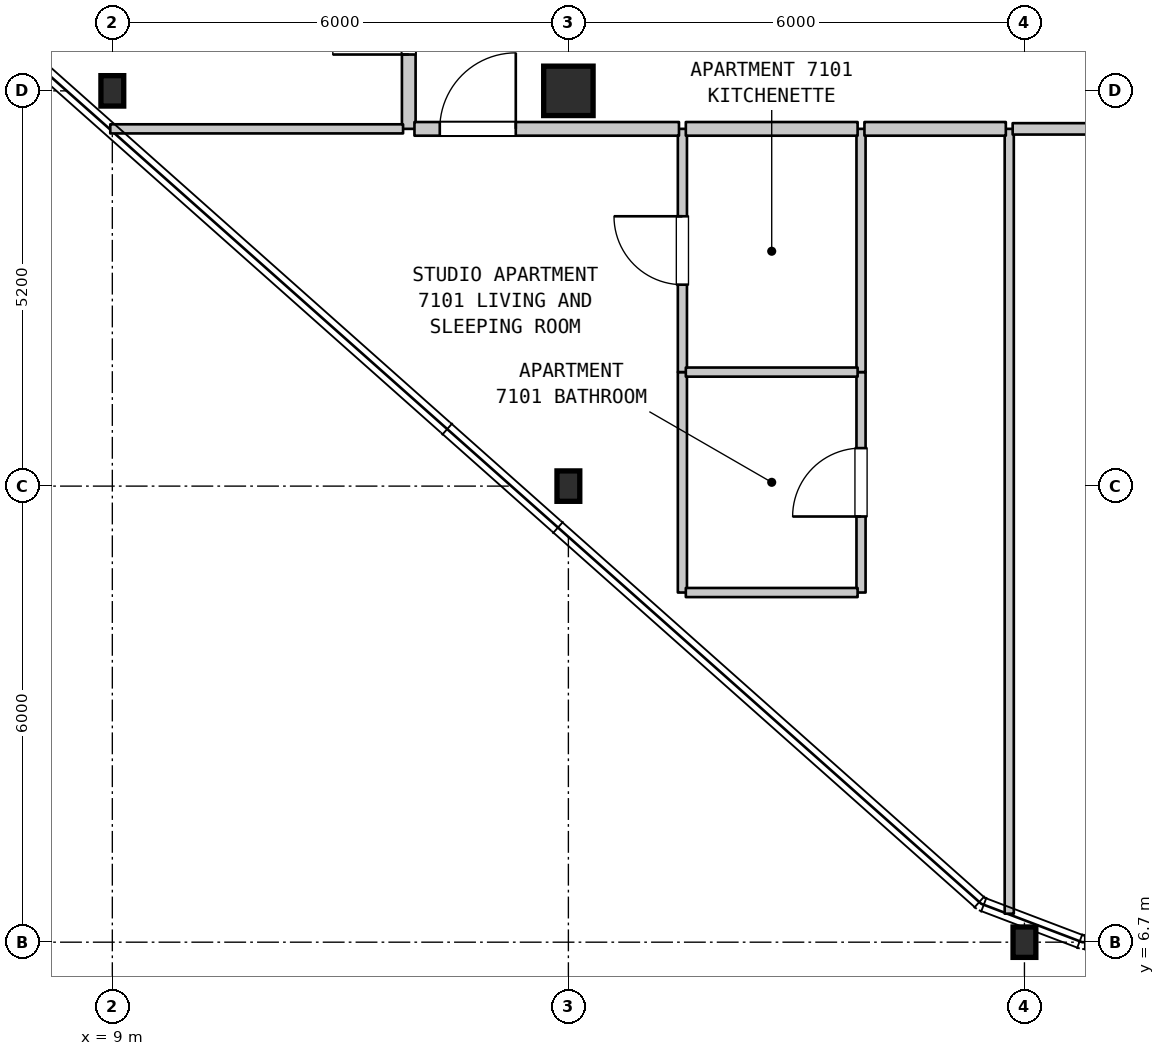
"""IFC4 building model, lengths in metres.
Left out: names, types, materials, properties, quantities, classifications, styles, units other than length and angle.
Written with IfcOpenShell. Run it as: python <this file> out.ifc"""

import sys

from ifc_helpers import new_model, si_unit, direction, frame, frame_2d, origin, origin_2d, place, context, subcontext, project, spatial, rectangle, i_section, extrude, element, fill, save


model = new_model("IFC4")
c1 = context("Model", 3, precision=1e-05, world=origin(), true_north=direction((0.0, 1.0)))
c2 = subcontext(c1, "Body", "Model", "MODEL_VIEW")
j1 = project(units=[si_unit("LENGTHUNIT", "METRE"), si_unit("PLANEANGLEUNIT", "RADIAN")], contexts=[c1])
p1 = place(None, origin())
s1 = spatial("IfcSite", under=j1, at=p1, CompositionType="ELEMENT")
p2 = place(p1, origin())
s2 = spatial("IfcBuilding", under=s1, at=p2, CompositionType="ELEMENT")
p3 = place(p2, frame((0.0, 0.0, 284.3)))
s3 = spatial("IfcBuildingStorey", under=s2, at=p3, CompositionType="ELEMENT", Elevation=284.3)
for number, where, z_axis, x_axis in (
    (1, (9.0, 17.9, 0.0), (0.0, 0.0, 1.0), (1.0, 0.0, 0.0)),
    (2, (15.0, 12.7, 0.0), (0.0, 0.0, 1.0), (1.0, 0.0, 0.0)),
):
    element("IfcColumn", number, at=place(p3, frame(where, z_axis=z_axis, x_axis=x_axis)), inside=s3, PredefinedType="COLUMN", context=c2, shape_type="SweptSolid", body=[
        extrude(i_section(OverallWidth=0.3, OverallDepth=0.4, WebThickness=0.013, FlangeThickness=0.024, FilletRadius=0.027, at=origin_2d()), origin(), (0.0, 0.0, 1.0), 3.7),
    ])
p4 = place(p3, frame((15.0, 17.9, 0.0), z_axis=(0.0, 0.0, 1.0), x_axis=(1.0, 0.0, 0.0)))
e3 = element("IfcColumn", 3, at=p4, inside=s3, PredefinedType="COLUMN", context=c2, shape_type="SweptSolid", body=[
    extrude(rectangle(XDim=0.65, YDim=0.65, at=origin_2d()), origin(), (0.0, 0.0, 1.0), 3.7),
])
p5 = place(p3, frame((21.0, 6.7, 0.0), z_axis=(0.0, 0.0, 1.0), x_axis=(1.0, 0.0, 0.0)))
e4 = element("IfcColumn", 4, at=p5, inside=s3, PredefinedType="COLUMN", context=c2, shape_type="SweptSolid", body=[
    extrude(i_section(OverallWidth=0.3, OverallDepth=0.4, WebThickness=0.013, FlangeThickness=0.024, FilletRadius=0.027, at=origin_2d()), origin(), (0.0, 0.0, 1.0), 3.7),
])
p6 = place(p3, frame((12.9, 17.4, 0.0), z_axis=(0.0, 0.0, 1.0), x_axis=(0.0, 1.0, 0.0)))
e5 = element("IfcWall", 5, at=p6, inside=s3, PredefinedType="STANDARD", context=c2, shape_type="SweptSolid", body=[
    extrude(rectangle(XDim=3.1, YDim=0.18, at=frame_2d((1.55, 0.0))), origin(), (0.0, 0.0, 1.0), 3.39),
])
p7 = place(p6, frame((0.978, 0.0, 0.0)))
e6 = element("IfcOpeningElement", 6, at=p7, cuts=e5, PredefinedType="OPENING", context=c2, shape_type="SweptSolid", body=[
    extrude(rectangle(XDim=1.0, YDim=2.15, at=frame_2d((0.5, 1.075))), frame((0.0, 0.1, 0.0), z_axis=(0.0, -1.0, 0.0), x_axis=(1.0, 0.0, 0.0)), (0.0, 0.0, 1.0), 0.2),
])
p8 = place(p3, frame((16.5, 11.3, 0.0), z_axis=(0.0, 0.0, 1.0), x_axis=(0.0, 1.0, 0.0)))
e7 = element("IfcWall", 7, at=p8, inside=s3, PredefinedType="PARTITIONING", context=c2, shape_type="SweptSolid", body=[
    extrude(rectangle(XDim=2.9, YDim=0.12, at=frame_2d((1.45, 0.0))), origin(), (0.0, 0.0, 1.0), 3.39),
])
p9 = place(p3, frame((16.5, 14.2, 0.0), z_axis=(0.0, 0.0, 1.0), x_axis=(0.0, 1.0, 0.0)))
e8 = element("IfcWall", 8, at=p9, inside=s3, PredefinedType="PARTITIONING", context=c2, shape_type="SweptSolid", body=[
    extrude(rectangle(XDim=3.2, YDim=0.12, at=frame_2d((1.6, 0.0))), origin(), (0.0, 0.0, 1.0), 3.39),
])
p10 = place(p9, frame((1.15, 0.0, 0.0)))
e9 = element("IfcOpeningElement", 9, at=p10, cuts=e8, PredefinedType="OPENING", context=c2, shape_type="SweptSolid", body=[
    extrude(rectangle(XDim=0.9, YDim=2.15, at=frame_2d((0.45, 1.075))), frame((0.0, 0.07, 0.0), z_axis=(0.0, -1.0, 0.0), x_axis=(1.0, 0.0, 0.0)), (0.0, 0.0, 1.0), 0.14),
])
p11 = place(p3, frame((18.85, 11.3, 0.0), z_axis=(0.0, 0.0, 1.0), x_axis=(0.0, 1.0, 0.0)))
e10 = element("IfcWall", 10, at=p11, inside=s3, PredefinedType="PARTITIONING", context=c2, shape_type="SweptSolid", body=[
    extrude(rectangle(XDim=2.9, YDim=0.12, at=frame_2d((1.45, 0.0))), origin(), (0.0, 0.0, 1.0), 3.39),
])
p12 = place(p11, frame((1.0, 0.0, 0.0)))
e11 = element("IfcOpeningElement", 11, at=p12, cuts=e10, PredefinedType="OPENING", context=c2, shape_type="SweptSolid", body=[
    extrude(rectangle(XDim=0.9, YDim=2.1, at=frame_2d((0.45, 1.05))), frame((0.0, 0.07, 0.0), z_axis=(0.0, -1.0, 0.0), x_axis=(1.0, 0.0, 0.0)), (0.0, 0.0, 1.0), 0.14),
])
p13 = place(p3, frame((18.85, 14.2, 0.0), z_axis=(0.0, 0.0, 1.0), x_axis=(0.0, 1.0, 0.0)))
e12 = element("IfcWall", 12, at=p13, inside=s3, PredefinedType="PARTITIONING", context=c2, shape_type="SweptSolid", body=[
    extrude(rectangle(XDim=3.2, YDim=0.12, at=frame_2d((1.6, 0.0))), origin(), (0.0, 0.0, 1.0), 3.39),
])
p14 = place(p3, frame((20.8, 7.075, 0.0), z_axis=(0.0, 0.0, 1.0), x_axis=(0.0, 1.0, 0.0)))
e13 = element("IfcWall", 13, at=p14, inside=s3, PredefinedType="PARTITIONING", context=c2, shape_type="SweptSolid", body=[
    extrude(rectangle(XDim=10.325, YDim=0.12, at=frame_2d((5.163, 0.0))), origin(), (0.0, 0.0, 1.0), 3.39),
])
for number, where, z_axis, x_axis in (
    (14, (16.545, 11.3, 0.0), (0.0, 0.0, 1.0), (1.0, 0.0, 0.0)),
    (15, (16.545, 14.2, 0.0), (0.0, 0.0, 1.0), (1.0, 0.0, 0.0)),
):
    element("IfcWall", number, at=place(p3, frame(where, z_axis=z_axis, x_axis=x_axis)), inside=s3, PredefinedType="PARTITIONING", context=c2, shape_type="SweptSolid", body=[
        extrude(rectangle(XDim=2.26, YDim=0.12, at=frame_2d((1.13, 0.0))), origin(), (0.0, 0.0, 1.0), 3.39),
    ])
p15 = place(p3, frame((8.973, 17.4, 0.0), z_axis=(0.0, 0.0, 1.0), x_axis=(1.0, 0.0, 0.0)))
e16 = element("IfcWall", 16, at=p15, inside=s3, PredefinedType="PARTITIONING", context=c2, shape_type="SweptSolid", body=[
    extrude(rectangle(XDim=3.852, YDim=0.12, at=frame_2d((1.926, 0.0))), origin(), (0.0, 0.0, 1.0), 3.39),
])
p16 = place(p3, frame((12.975, 17.4, 0.0), z_axis=(0.0, 0.0, 1.0), x_axis=(1.0, 0.0, 0.0)))
e17 = element("IfcWall", 17, at=p16, inside=s3, PredefinedType="STANDARD", context=c2, shape_type="SweptSolid", body=[
    extrude(rectangle(XDim=3.48, YDim=0.18, at=frame_2d((1.74, 0.0))), origin(), (0.0, 0.0, 1.0), 3.39),
])
p17 = place(p16, frame((0.333, 0.0, 0.0)))
e18 = element("IfcOpeningElement", 18, at=p17, cuts=e17, PredefinedType="OPENING", context=c2, shape_type="SweptSolid", body=[
    extrude(rectangle(XDim=1.0, YDim=2.15, at=frame_2d((0.5, 1.075))), frame((0.0, 0.1, 0.0), z_axis=(0.0, -1.0, 0.0), x_axis=(1.0, 0.0, 0.0)), (0.0, 0.0, 1.0), 0.2),
])
p18 = place(p3, frame((16.545, 17.4, 0.0), z_axis=(0.0, 0.0, 1.0), x_axis=(1.0, 0.0, 0.0)))
e19 = element("IfcWall", 19, at=p18, inside=s3, PredefinedType="STANDARD", context=c2, shape_type="SweptSolid", body=[
    extrude(rectangle(XDim=2.26, YDim=0.18, at=frame_2d((1.13, 0.0))), origin(), (0.0, 0.0, 1.0), 3.39),
])
p19 = place(p3, frame((18.895, 17.4, 0.0), z_axis=(0.0, 0.0, 1.0), x_axis=(1.0, 0.0, 0.0)))
e20 = element("IfcWall", 20, at=p19, inside=s3, PredefinedType="STANDARD", context=c2, shape_type="SweptSolid", body=[
    extrude(rectangle(XDim=1.86, YDim=0.18, at=frame_2d((0.93, 0.0))), origin(), (0.0, 0.0, 1.0), 3.39),
])
p20 = place(p3, frame((20.845, 17.4, 0.0), z_axis=(0.0, 0.0, 1.0), x_axis=(1.0, 0.0, 0.0)))
e21 = element("IfcWall", 21, at=p20, inside=s3, PredefinedType="STANDARD", context=c2, shape_type="SweptSolid", body=[
    extrude(rectangle(XDim=3.91, YDim=0.15, at=frame_2d((1.955, 0.0))), origin(), (0.0, 0.0, 1.0), 3.39),
])
p21 = place(p20, frame((1.455, 0.0, 0.0)))
e22 = element("IfcOpeningElement", 22, at=p21, cuts=e21, PredefinedType="OPENING", context=c2, shape_type="SweptSolid", body=[
    extrude(rectangle(XDim=1.0, YDim=2.15, at=frame_2d((0.5, 1.075))), frame((0.0, 0.085, 0.0), z_axis=(0.0, -1.0, 0.0), x_axis=(1.0, 0.0, 0.0)), (0.0, 0.0, 1.0), 0.17),
])
p22 = place(p7, origin())
e23 = element("IfcDoor", 23, at=p22, inside=s3, OperationType="SINGLE_SWING_LEFT", PredefinedType="DOOR", context=c2, shape_type="SweptSolid", body=[
    extrude(rectangle(XDim=1.0, YDim=2.15, at=frame_2d((0.5, 1.075))), frame((0.0, 0.025, 0.0), z_axis=(0.0, -1.0, 0.0), x_axis=(1.0, 0.0, 0.0)), (0.0, 0.0, 1.0), 0.05),
])
fill(e6, e23)
p23 = place(p10, origin())
e24 = element("IfcDoor", 24, at=p23, inside=s3, OperationType="SINGLE_SWING_RIGHT", PredefinedType="DOOR", context=c2, shape_type="SweptSolid", body=[
    extrude(rectangle(XDim=0.9, YDim=2.15, at=frame_2d((0.45, 1.075))), frame((0.0, 0.025, 0.0), z_axis=(0.0, -1.0, 0.0), x_axis=(1.0, 0.0, 0.0)), (0.0, 0.0, 1.0), 0.05),
])
fill(e9, e24)
p24 = place(p12, origin())
e25 = element("IfcDoor", 25, at=p24, inside=s3, OperationType="SINGLE_SWING_LEFT", PredefinedType="DOOR", context=c2, shape_type="SweptSolid", body=[
    extrude(rectangle(XDim=0.9, YDim=2.1, at=frame_2d((0.45, 1.05))), frame((0.0, 0.025, 0.0), z_axis=(0.0, -1.0, 0.0), x_axis=(1.0, 0.0, 0.0)), (0.0, 0.0, 1.0), 0.05),
])
fill(e11, e25)
p25 = place(p17, origin())
e26 = element("IfcDoor", 26, at=p25, inside=s3, OperationType="SINGLE_SWING_RIGHT", PredefinedType="DOOR", context=c2, shape_type="SweptSolid", body=[
    extrude(rectangle(XDim=1.0, YDim=2.15, at=frame_2d((0.5, 1.075))), frame((0.0, 0.025, 0.0), z_axis=(0.0, -1.0, 0.0), x_axis=(1.0, 0.0, 0.0)), (0.0, 0.0, 1.0), 0.05),
])
fill(e18, e26)
save(model, sys.argv[1])
